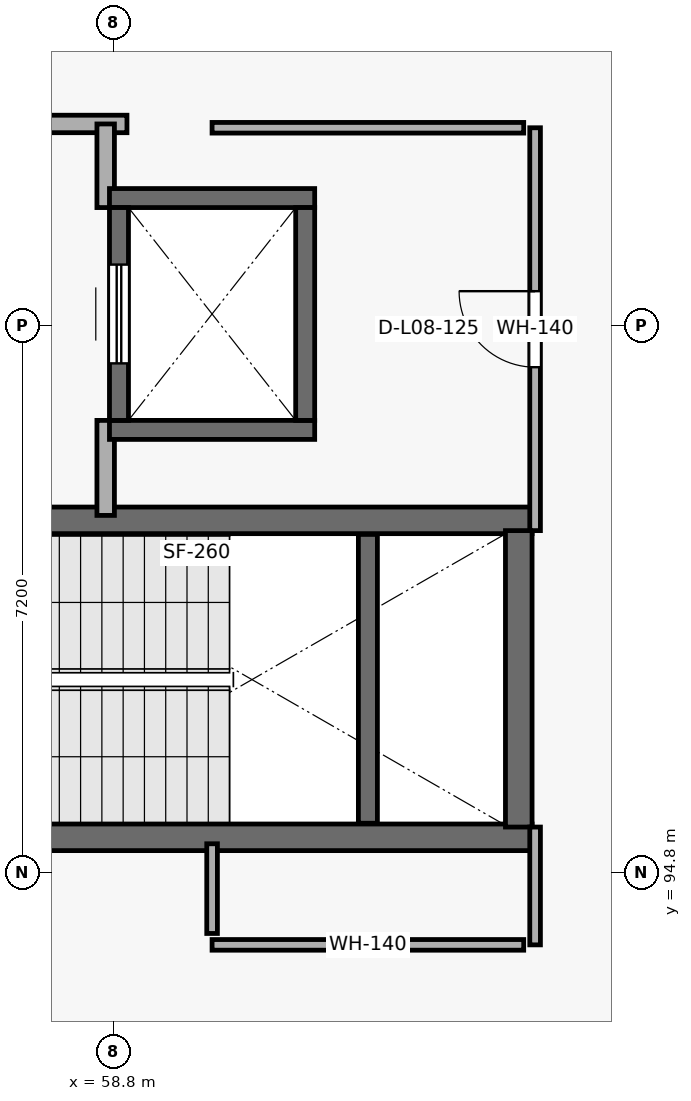
"""IFC4 building model, lengths in metres.
Left out: names, types, materials, properties, quantities, classifications, styles, units other than length and angle.
Written with IfcOpenShell. Run it as: python <this file> out.ifc"""

import sys

from ifc_helpers import new_model, si_unit, direction, frame, frame_2d, origin, place, context, subcontext, project, spatial, rectangle, extrude, element, fill, save


model = new_model("IFC4")
c1 = context("Model", 3, precision=1e-05, world=origin(), true_north=direction((0.0, 1.0)))
c2 = subcontext(c1, "Body", "Model", "MODEL_VIEW")
j1 = project(units=[si_unit("LENGTHUNIT", "METRE"), si_unit("PLANEANGLEUNIT", "RADIAN")], contexts=[c1])
p1 = place(None, origin())
s1 = spatial("IfcSite", under=j1, at=p1, CompositionType="ELEMENT")
p2 = place(p1, origin())
s2 = spatial("IfcBuilding", under=s1, at=p2, CompositionType="ELEMENT")
p3 = place(p2, frame((0.0, 0.0, 35.7)))
s3 = spatial("IfcBuildingStorey", under=s2, at=p3, CompositionType="ELEMENT", Elevation=35.7)
p4 = place(p3, frame((55.09, 95.265, 0.0), z_axis=(0.0, 0.0, 1.0), x_axis=(1.0, 0.0, 0.0)))
e1 = element("IfcWall", 1, at=p4, inside=s3, PredefinedType="SHEAR", context=c2, shape_type="SweptSolid", body=[
    extrude(rectangle(XDim=9.22, YDim=0.35, at=frame_2d((4.61, 0.0))), origin(), (0.0, 0.0, 1.0), 4.24),
])
p5 = place(p4, frame((0.45, 0.0, 0.0)))
e2 = element("IfcOpeningElement", 2, at=p5, cuts=e1, PredefinedType="OPENING", context=c2, shape_type="SweptSolid", body=[
    extrude(rectangle(XDim=1.25, YDim=2.2, at=frame_2d((0.625, 1.1))), frame((0.0, 0.185, 0.0), z_axis=(0.0, -1.0, 0.0), x_axis=(1.0, 0.0, 0.0)), (0.0, 0.0, 1.0), 0.37),
])
p6 = place(p3, frame((64.31, 99.435, 0.0), z_axis=(0.0, 0.0, 1.0), x_axis=(-1.0, 0.0, 0.0)))
e3 = element("IfcWall", 3, at=p6, inside=s3, PredefinedType="SHEAR", context=c2, shape_type="SweptSolid", body=[
    extrude(rectangle(XDim=9.22, YDim=0.35, at=frame_2d((4.61, 0.0))), origin(), (0.0, 0.0, 1.0), 4.24),
])
p7 = place(p6, frame((7.72, 0.0, 0.0)))
e4 = element("IfcOpeningElement", 4, at=p7, cuts=e3, PredefinedType="OPENING", context=c2, shape_type="SweptSolid", body=[
    extrude(rectangle(XDim=1.2, YDim=2.2, at=frame_2d((0.6, 1.1))), frame((0.0, 0.185, 0.0), z_axis=(0.0, -1.0, 0.0), x_axis=(1.0, 0.0, 0.0)), (0.0, 0.0, 1.0), 0.37),
])
p8 = place(p3, frame((64.135, 99.3, 0.0), z_axis=(0.0, 0.0, 1.0), x_axis=(0.0, -1.0, 0.0)))
e5 = element("IfcWall", 5, at=p8, inside=s3, PredefinedType="SHEAR", context=c2, shape_type="SweptSolid", body=[
    extrude(rectangle(XDim=3.9, YDim=0.35, at=frame_2d((1.95, 0.0))), origin(), (0.0, 0.0, 1.0), 4.24),
])
p9 = place(p3, frame((62.15, 95.45, 0.0), z_axis=(0.0, 0.0, 1.0), x_axis=(0.0, 1.0, 0.0)))
e6 = element("IfcWall", 6, at=p9, inside=s3, PredefinedType="SHEAR", context=c2, shape_type="SweptSolid", body=[
    extrude(rectangle(XDim=3.8, YDim=0.25, at=frame_2d((1.9, 0.0))), origin(), (0.0, 0.0, 1.0), 2.07),
])
p10 = place(p3, frame((55.09, 104.65, 0.0), z_axis=(0.0, 0.0, 1.0), x_axis=(1.0, 0.0, 0.0)))
e7 = element("IfcWall", 7, at=p10, inside=s3, PredefinedType="PARTITIONING", context=c2, shape_type="SweptSolid", body=[
    extrude(rectangle(XDim=3.89, YDim=0.23, at=frame_2d((1.945, 0.0))), origin(), (0.0, 0.0, 1.0), 4.24),
])
p11 = place(p10, frame((1.15, 0.0, 0.0)))
e8 = element("IfcOpeningElement", 8, at=p11, cuts=e7, PredefinedType="OPENING", context=c2, shape_type="SweptSolid", body=[
    extrude(rectangle(XDim=1.2, YDim=2.2, at=frame_2d((0.6, 1.1))), frame((0.0, 0.125, 0.0), z_axis=(0.0, -1.0, 0.0), x_axis=(1.0, 0.0, 0.0)), (0.0, 0.0, 1.0), 0.25),
])
p12 = place(p3, frame((58.7, 104.65, 0.0), z_axis=(0.0, 0.0, 1.0), x_axis=(0.0, -1.0, 0.0)))
e9 = element("IfcWall", 9, at=p12, inside=s3, PredefinedType="PARTITIONING", context=c2, shape_type="SweptSolid", body=[
    extrude(rectangle(XDim=1.1, YDim=0.23, at=frame_2d((0.55, 0.0))), origin(), (0.0, 0.0, 1.0), 4.24),
])
p13 = place(p3, frame((58.7, 100.75, 0.0), z_axis=(0.0, 0.0, 1.0), x_axis=(0.0, -1.0, 0.0)))
e10 = element("IfcWall", 10, at=p13, inside=s3, PredefinedType="PARTITIONING", context=c2, shape_type="SweptSolid", body=[
    extrude(rectangle(XDim=1.25, YDim=0.23, at=frame_2d((0.625, 0.0))), origin(), (0.0, 0.0, 1.0), 4.24),
])
for number, where, z_axis, x_axis in (
    (11, (58.75, 100.625, 0.0), (0.0, 0.0, 1.0), (1.0, 0.0, 0.0)),
    (12, (61.45, 103.675, 0.0), (0.0, 0.0, 1.0), (-1.0, 0.0, 0.0)),
):
    element("IfcWall", number, at=place(p3, frame(where, z_axis=z_axis, x_axis=x_axis)), inside=s3, PredefinedType="SHEAR", context=c2, shape_type="SweptSolid", body=[
        extrude(rectangle(XDim=2.7, YDim=0.25, at=frame_2d((1.35, 0.0))), origin(), (0.0, 0.0, 1.0), 4.24),
    ])
p14 = place(p3, frame((58.875, 100.75, 0.0), z_axis=(0.0, 0.0, 1.0), x_axis=(0.0, 1.0, 0.0)))
e13 = element("IfcWall", 13, at=p14, inside=s3, PredefinedType="SHEAR", context=c2, shape_type="SweptSolid", body=[
    extrude(rectangle(XDim=2.8, YDim=0.25, at=frame_2d((1.4, 0.0))), origin(), (0.0, 0.0, 1.0), 4.24),
])
p15 = place(p14, frame((0.75, 0.0, 0.0)))
e14 = element("IfcOpeningElement", 14, at=p15, cuts=e13, PredefinedType="OPENING", context=c2, shape_type="SweptSolid", body=[
    extrude(rectangle(XDim=1.3, YDim=2.25, at=frame_2d((0.65, 1.125))), frame((0.0, 0.135, 0.0), z_axis=(0.0, -1.0, 0.0), x_axis=(1.0, 0.0, 0.0)), (0.0, 0.0, 1.0), 0.27),
])
p16 = place(p3, frame((61.325, 103.55, 0.0), z_axis=(0.0, 0.0, 1.0), x_axis=(0.0, -1.0, 0.0)))
e15 = element("IfcWall", 15, at=p16, inside=s3, PredefinedType="SHEAR", context=c2, shape_type="SweptSolid", body=[
    extrude(rectangle(XDim=2.8, YDim=0.25, at=frame_2d((1.4, 0.0))), origin(), (0.0, 0.0, 1.0), 4.24),
])
p17 = place(p3, frame((64.35, 104.6, 0.0), z_axis=(0.0, 0.0, 1.0), x_axis=(0.0, -1.0, 0.0)))
e16 = element("IfcWall", 16, at=p17, inside=s3, PredefinedType="PARTITIONING", context=c2, shape_type="SweptSolid", body=[
    extrude(rectangle(XDim=5.3, YDim=0.14, at=frame_2d((2.65, 0.0))), origin(), (0.0, 0.0, 1.0), 4.24),
])
p18 = place(p17, frame((2.15, 0.0, 0.0)))
e17 = element("IfcOpeningElement", 17, at=p18, cuts=e16, PredefinedType="OPENING", context=c2, shape_type="SweptSolid", body=[
    extrude(rectangle(XDim=1.0, YDim=2.22, at=frame_2d((0.5, 1.11))), frame((0.0, 0.08, 0.0), z_axis=(0.0, -1.0, 0.0), x_axis=(1.0, 0.0, 0.0)), (0.0, 0.0, 1.0), 0.16),
])
p19 = place(p3, frame((64.35, 95.4, 0.0), z_axis=(0.0, 0.0, 1.0), x_axis=(0.0, -1.0, 0.0)))
e18 = element("IfcWall", 18, at=p19, inside=s3, PredefinedType="PARTITIONING", context=c2, shape_type="SweptSolid", body=[
    extrude(rectangle(XDim=1.55, YDim=0.14, at=frame_2d((0.775, 0.0))), origin(), (0.0, 0.0, 1.0), 4.24),
])
for number, where, z_axis, x_axis in (
    (19, (60.1, 104.6, 0.0), (0.0, 0.0, 1.0), (1.0, 0.0, 0.0)),
    (20, (64.2, 93.85, 0.0), (0.0, 0.0, 1.0), (-1.0, 0.0, 0.0)),
):
    element("IfcWall", number, at=place(p3, frame(where, z_axis=z_axis, x_axis=x_axis)), inside=s3, PredefinedType="PARTITIONING", context=c2, shape_type="SweptSolid", body=[
        extrude(rectangle(XDim=4.1, YDim=0.14, at=frame_2d((2.05, 0.0))), origin(), (0.0, 0.0, 1.0), 4.24),
    ])
p20 = place(p3, frame((60.1, 94.0, 0.0), z_axis=(0.0, 0.0, 1.0), x_axis=(0.0, 1.0, 0.0)))
e21 = element("IfcWall", 21, at=p20, inside=s3, PredefinedType="PARTITIONING", context=c2, shape_type="SweptSolid", body=[
    extrude(rectangle(XDim=1.18, YDim=0.14, at=frame_2d((0.59, 0.0))), origin(), (0.0, 0.0, 1.0), 4.24),
])
p21 = place(p15, origin())
e22 = element("IfcDoor", 22, at=p21, inside=s3, OperationType="SLIDING_TO_LEFT", PredefinedType="DOOR", context=c2, shape_type="SweptSolid", body=[
    extrude(rectangle(XDim=1.3, YDim=2.25, at=frame_2d((0.65, 1.125))), frame((0.0, 0.025, 0.0), z_axis=(0.0, -1.0, 0.0), x_axis=(1.0, 0.0, 0.0)), (0.0, 0.0, 1.0), 0.05),
])
fill(e14, e22)
p22 = place(p18, origin())
e23 = element("IfcDoor", 23, at=p22, inside=s3, OperationType="SINGLE_SWING_RIGHT", PredefinedType="DOOR", context=c2, shape_type="SweptSolid", body=[
    extrude(rectangle(XDim=1.0, YDim=2.22, at=frame_2d((0.5, 1.11))), frame((0.0, 0.025, 0.0), z_axis=(0.0, -1.0, 0.0), x_axis=(1.0, 0.0, 0.0)), (0.0, 0.0, 1.0), 0.05),
])
fill(e17, e23)
save(model, sys.argv[1])
